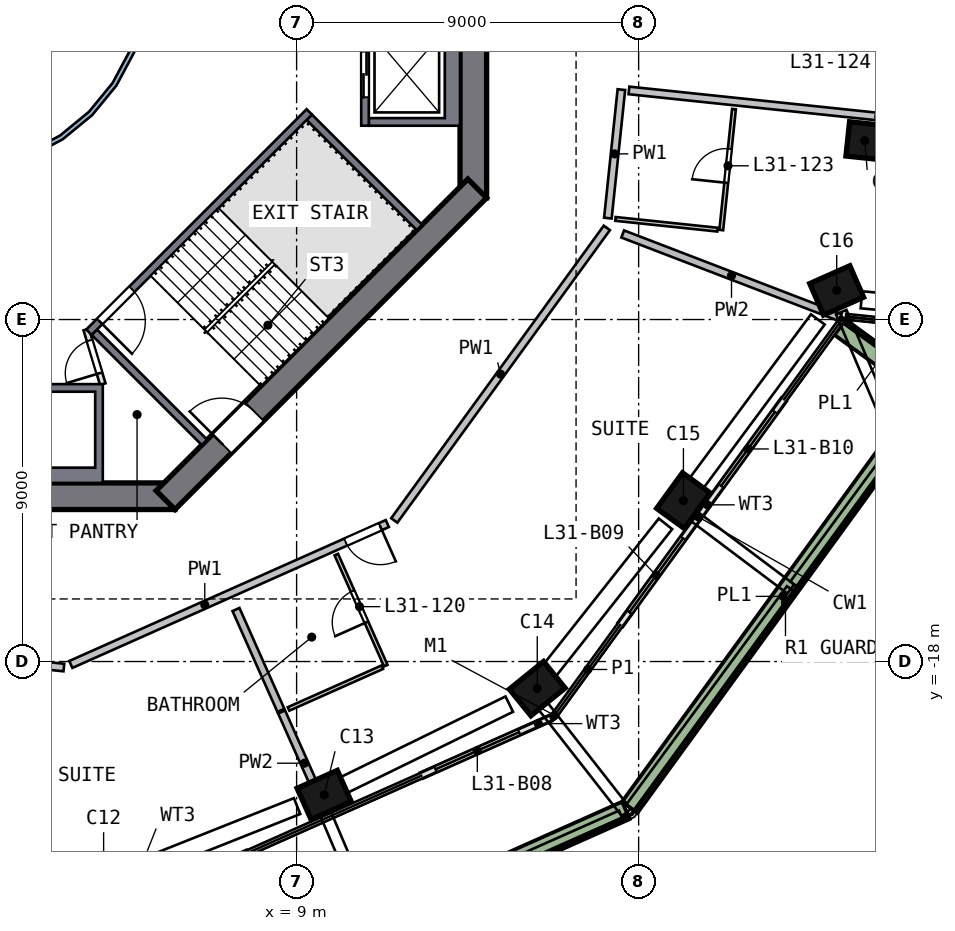
"""IFC4 building model, lengths in metres.
Left out: names, types, materials, properties, quantities, classifications, styles, units other than length and angle.
Written with IfcOpenShell. Run it as: python <this file> out.ifc"""

import sys

from ifc_helpers import new_model, si_unit, direction, frame, frame_2d, origin, origin_2d, place, context, subcontext, project, spatial, polyline, rectangle, outline, extrude, element, fill, save


model = new_model("IFC4")
c1 = context("Model", 3, precision=1e-05, world=origin(), true_north=direction((0.0, 1.0)))
c2 = subcontext(c1, "Body", "Model", "MODEL_VIEW")
j1 = project(units=[si_unit("LENGTHUNIT", "METRE"), si_unit("PLANEANGLEUNIT", "RADIAN")], contexts=[c1])
p1 = place(None, origin())
s1 = spatial("IfcSite", under=j1, at=p1, CompositionType="ELEMENT")
p2 = place(p1, origin())
s2 = spatial("IfcBuilding", under=s1, at=p2, CompositionType="ELEMENT")
p3 = place(p2, frame((0.0, 0.0, 133.0)))
s3 = spatial("IfcBuildingStorey", under=s2, at=p3, CompositionType="ELEMENT", Elevation=133.0)
p4 = place(p3, frame((9.602, -21.567, 0.0), z_axis=(0.102211608, 0.046542786, 0.993673264), x_axis=(0.907792136, 0.40410505, -0.112305596)))
e1 = element("IfcColumn", 1, at=p4, inside=s3, PredefinedType="COLUMN", context=c2, shape_type="SweptSolid", body=[
    extrude(rectangle(XDim=1.15, YDim=0.9, at=origin_2d()), origin(), (0.0, 0.0, 1.0), 3.21),
])
p5 = place(p3, frame((15.225, -18.801, 0.0), z_axis=(0.088798823, 0.073137387, 0.993360806), x_axis=(-0.772101593, -0.62500061, 0.115036373)))
e2 = element("IfcColumn", 2, at=p5, inside=s3, PredefinedType="COLUMN", context=c2, shape_type="SweptSolid", body=[
    extrude(rectangle(XDim=1.15, YDim=0.9, at=origin_2d()), origin(), (0.0, 0.0, 1.0), 3.211),
])
p6 = place(p3, frame((19.1, -13.877, 0.0), z_axis=(0.065251144, 0.091412441, 0.993673012), x_axis=(0.584148171, 0.803839453, -0.112307833)))
e3 = element("IfcColumn", 3, at=p6, inside=s3, PredefinedType="COLUMN", context=c2, shape_type="SweptSolid", body=[
    extrude(rectangle(XDim=1.15, YDim=0.9, at=origin_2d()), origin(), (0.0, 0.0, 1.0), 3.21),
])
p7 = place(p3, frame((23.164, -8.367, 0.0), z_axis=(0.038840208, 0.110439964, 0.993123584), x_axis=(-0.913350334, -0.399215187, 0.080114931)))
e4 = element("IfcColumn", 4, at=p7, inside=s3, PredefinedType="COLUMN", context=c2, shape_type="SweptSolid", body=[
    extrude(rectangle(XDim=1.15, YDim=0.9, at=origin_2d()), origin(), (0.0, 0.0, 1.0), 3.212),
])
p8 = place(p3, frame((23.926, -4.432, 0.0), z_axis=(0.020069399, 0.113954657, 0.99328322), x_axis=(0.99443788, -0.105017082, -0.008044619)))
e5 = element("IfcColumn", 5, at=p8, inside=s3, PredefinedType="COLUMN", context=c2, shape_type="SweptSolid", body=[
    extrude(rectangle(XDim=0.9, YDim=0.9, at=origin_2d()), origin(), (0.0, 0.0, 1.0), 3.211),
])
p9 = place(p3, frame((13.65, -5.799, 0.0), z_axis=(0.0, 0.0, 1.0), x_axis=(0.0, 1.0, 0.0)))
e6 = element("IfcWall", 6, at=p9, inside=s3, PredefinedType="SHEAR", context=c2, shape_type="SweptSolid", body=[
    extrude(rectangle(XDim=11.598, YDim=0.7, at=frame_2d((5.799, 0.0))), origin(), (0.0, 0.0, 1.0), 3.5),
])
p10 = place(p9, frame((4.899, 0.0, 0.0)))
e7 = element("IfcOpeningElement", 7, at=p10, cuts=e6, PredefinedType="OPENING", context=c2, shape_type="SweptSolid", body=[
    extrude(rectangle(XDim=1.8, YDim=2.1, at=frame_2d((0.9, 1.05))), frame((0.0, 0.36, 0.0), z_axis=(0.0, -1.0, 0.0), x_axis=(1.0, 0.0, 0.0)), (0.0, 0.0, 1.0), 0.72),
])
p11 = place(p3, frame((-5.799, -13.65, 0.0), z_axis=(0.0, 0.0, 1.0), x_axis=(1.0, 0.0, 0.0)))
e8 = element("IfcWall", 8, at=p11, inside=s3, PredefinedType="SHEAR", context=c2, shape_type="SweptSolid", body=[
    extrude(rectangle(XDim=11.598, YDim=0.7, at=frame_2d((5.799, 0.0))), origin(), (0.0, 0.0, 1.0), 3.5),
])
p12 = place(p11, frame((4.899, 0.0, 0.0)))
e9 = element("IfcOpeningElement", 9, at=p12, cuts=e8, PredefinedType="OPENING", context=c2, shape_type="SweptSolid", body=[
    extrude(rectangle(XDim=1.8, YDim=2.1, at=frame_2d((0.9, 1.05))), frame((0.0, 0.36, 0.0), z_axis=(0.0, -1.0, 0.0), x_axis=(1.0, 0.0, 0.0)), (0.0, 0.0, 1.0), 0.72),
])
p13 = place(p3, frame((5.552, -13.752, 0.0), z_axis=(0.0, 0.0, 1.0), x_axis=(0.707106781, 0.707106781, 0.0)))
e10 = element("IfcWall", 10, at=p13, inside=s3, PredefinedType="SHEAR", context=c2, shape_type="SweptSolid", body=[
    extrude(rectangle(XDim=11.598, YDim=0.7, at=frame_2d((5.799, 0.0))), origin(), (0.0, 0.0, 1.0), 3.5),
])
p14 = place(p13, frame((2.099, 0.0, 0.0)))
e11 = element("IfcOpeningElement", 11, at=p14, cuts=e10, PredefinedType="OPENING", context=c2, shape_type="SweptSolid", body=[
    extrude(rectangle(XDim=1.2, YDim=2.1, at=frame_2d((0.6, 1.05))), frame((0.0, 0.36, 0.0), z_axis=(0.0, -1.0, 0.0), x_axis=(1.0, 0.0, 0.0)), (0.0, 0.0, 1.0), 0.72),
])
p15 = place(p3, frame((3.99, -24.696, 0.0), z_axis=(0.0, 0.0, 1.0), x_axis=(0.913541573, 0.406745368, 0.0)))
e12 = element("IfcWall", 12, at=p15, inside=s3, PredefinedType="SOLIDWALL", context=c2, shape_type="SweptSolid", body=[
    extrude(rectangle(XDim=4.068, YDim=0.15, at=frame_2d((2.034, 0.0))), origin(), (0.0, 0.0, 1.0), 2.475),
])
p16 = place(p15, frame((1.268, 0.0, 0.0)))
e13 = element("IfcOpeningElement", 13, at=p16, cuts=e12, PredefinedType="OPENING", context=c2, shape_type="SweptSolid", body=[
    extrude(rectangle(XDim=2.4, YDim=2.4, at=frame_2d((1.2, 1.2))), frame((0.0, 0.085, 0.0), z_axis=(0.0, -1.0, 0.0), x_axis=(1.0, 0.0, 0.0)), (0.0, 0.0, 1.0), 0.17),
])
p17 = place(p3, frame((12.293, -20.999, 0.0), z_axis=(0.0, 0.0, 1.0), x_axis=(0.913548143, 0.406730611, 0.0)))
e14 = element("IfcWall", 14, at=p17, inside=s3, PredefinedType="SOLIDWALL", context=c2, shape_type="SweptSolid", body=[
    extrude(rectangle(XDim=3.71, YDim=0.15, at=frame_2d((1.855, 0.0))), origin(), (0.0, 0.0, 1.0), 2.475),
])
p18 = place(p17, frame((0.4, 0.0, 0.0)))
e15 = element("IfcOpeningElement", 15, at=p18, cuts=e14, PredefinedType="OPENING", context=c2, shape_type="SweptSolid", body=[
    extrude(rectangle(XDim=2.4, YDim=2.4, at=frame_2d((1.2, 1.2))), frame((0.0, 0.085, 0.0), z_axis=(0.0, -1.0, 0.0), x_axis=(1.0, 0.0, 0.0)), (0.0, 0.0, 1.0), 0.17),
])
p19 = place(p3, frame((17.522, -17.026, 0.0), z_axis=(0.0, 0.0, 1.0), x_axis=(0.587778943, 0.809021578, 0.0)))
e16 = element("IfcWall", 16, at=p19, inside=s3, PredefinedType="SOLIDWALL", context=c2, shape_type="SweptSolid", body=[
    extrude(rectangle(XDim=3.475, YDim=0.15, at=frame_2d((1.737, 0.0))), origin(), (0.0, 0.0, 1.0), 2.475),
])
p20 = place(p19, frame((0.4, 0.0, 0.0)))
e17 = element("IfcOpeningElement", 17, at=p20, cuts=e16, PredefinedType="OPENING", context=c2, shape_type="SweptSolid", body=[
    extrude(rectangle(XDim=2.4, YDim=2.4, at=frame_2d((1.2, 1.2))), frame((0.0, 0.085, 0.0), z_axis=(0.0, -1.0, 0.0), x_axis=(1.0, 0.0, 0.0)), (0.0, 0.0, 1.0), 0.17),
])
p21 = place(p3, frame((19.565, -14.215, 0.0), z_axis=(0.0, 0.0, 1.0), x_axis=(0.58777044, 0.809027756, 0.0)))
e18 = element("IfcWall", 18, at=p21, inside=s3, PredefinedType="SOLIDWALL", context=c2, shape_type="SweptSolid", body=[
    extrude(rectangle(XDim=3.835, YDim=0.15, at=frame_2d((1.918, 0.0))), origin(), (0.0, 0.0, 1.0), 2.475),
])
p22 = place(p21, frame((1.035, 0.0, 0.0)))
e19 = element("IfcOpeningElement", 19, at=p22, cuts=e18, PredefinedType="OPENING", context=c2, shape_type="SweptSolid", body=[
    extrude(rectangle(XDim=2.4, YDim=2.4, at=frame_2d((1.2, 1.2))), frame((0.0, 0.085, 0.0), z_axis=(0.0, -1.0, 0.0), x_axis=(1.0, 0.0, 0.0)), (0.0, 0.0, 1.0), 0.17),
])
p23 = place(p3, frame((5.585, -27.296, 0.0), z_axis=(0.0, 0.0, 1.0), x_axis=(0.913544877, 0.406737947, 0.0)))
e20 = element("IfcWall", 20, at=p23, inside=s3, PredefinedType="SOLIDWALL", context=c2, shape_type="SweptSolid", body=[
    extrude(rectangle(XDim=13.223, YDim=0.5, at=frame_2d((6.612, 0.0))), origin(), (0.0, 0.0, 1.0), 0.7),
])
p24 = place(p3, frame((17.766, -21.837, 0.0), z_axis=(0.0, 0.0, 1.0), x_axis=(0.587782365, 0.809019092, 0.0)))
e21 = element("IfcWall", 21, at=p24, inside=s3, PredefinedType="SOLIDWALL", context=c2, shape_type="SweptSolid", body=[
    extrude(rectangle(XDim=13.723, YDim=0.5, at=frame_2d((6.862, 0.0))), origin(), (0.0, 0.0, 1.0), 0.7),
])
p25 = place(p3, frame((25.483, -10.789, 0.0), z_axis=(0.0, 0.0, 1.0), x_axis=(-0.809025441, 0.587773626, 0.0)))
e22 = element("IfcWall", 22, at=p25, inside=s3, PredefinedType="SOLIDWALL", context=c2, shape_type="SweptSolid", body=[
    extrude(rectangle(XDim=2.699, YDim=0.5, at=frame_2d((1.35, 0.0))), origin(), (0.0, 0.0, 1.0), 0.7),
])
p26 = place(p3, origin())
e23 = element("IfcWall", 23, at=p26, inside=s3, PredefinedType="SOLIDWALL", context=c2, shape_type="SweptSolid", body=[
    extrude(outline(polyline([(13.3, -3.9), (10.9, -3.9), (10.9, -3.7), (12.9, -3.7), (12.9, -1.4), (10.9, -1.4), (10.9, -1.2), (13.3, -1.2), (13.3, -3.9)])), origin(), (0.0, 0.0, 1.0), 3.19),
])
p27 = place(p3, frame((10.8, -1.2, 0.0), z_axis=(0.0, 0.0, 1.0), x_axis=(0.0, -1.0, 0.0)))
e24 = element("IfcWall", 24, at=p27, inside=s3, PredefinedType="SOLIDWALL", context=c2, shape_type="SweptSolid", body=[
    extrude(rectangle(XDim=2.7, YDim=0.2, at=frame_2d((1.35, 0.0))), origin(), (0.0, 0.0, 1.0), 3.19),
])
p28 = place(p27, frame((0.75, 0.0, 0.0)))
e25 = element("IfcOpeningElement", 25, at=p28, cuts=e24, PredefinedType="OPENING", context=c2, shape_type="SweptSolid", body=[
    extrude(rectangle(XDim=1.2, YDim=2.1, at=frame_2d((0.6, 1.05))), frame((0.0, 0.11, 0.0), z_axis=(0.0, -1.0, 0.0), x_axis=(1.0, 0.0, 0.0)), (0.0, 0.0, 1.0), 0.22),
])
p29 = place(p3, origin())
e26 = element("IfcWall", 26, at=p29, inside=s3, PredefinedType="SOLIDWALL", context=c2, shape_type="SweptSolid", body=[
    extrude(outline(polyline([(3.9, -10.7), (3.9, -13.3), (1.2, -13.3), (1.2, -10.7), (3.9, -10.7)]), holes=[polyline([(1.4, -12.9), (3.7, -12.9), (3.7, -10.9), (1.4, -10.9), (1.4, -12.9)])]), origin(), (0.0, 0.0, 1.0), 3.19),
])
p30 = place(p3, frame((9.334, -3.535, 0.0), z_axis=(0.0, 0.0, 1.0), x_axis=(-0.707106781, -0.707106781, 0.0)))
e27 = element("IfcWall", 27, at=p30, inside=s3, PredefinedType="SOLIDWALL", context=c2, shape_type="SweptSolid", body=[
    extrude(rectangle(XDim=8.2, YDim=0.2, at=frame_2d((4.1, 0.0))), origin(), (0.0, 0.0, 1.0), 3.19),
])
p31 = place(p30, frame((6.6, 0.0, 0.0)))
e28 = element("IfcOpeningElement", 28, at=p31, cuts=e27, PredefinedType="OPENING", context=c2, shape_type="SweptSolid", body=[
    extrude(rectangle(XDim=1.2, YDim=2.1, at=frame_2d((0.6, 1.05))), frame((0.0, 0.11, 0.0), z_axis=(0.0, -1.0, 0.0), x_axis=(1.0, 0.0, 0.0)), (0.0, 0.0, 1.0), 0.22),
])
for number, where, z_axis, x_axis in (
    (29, (3.677, -9.334, 0.0), (0.0, 0.0, 1.0), (0.707, -0.707, 0.0)),
    (30, (9.334, -3.677, 0.0), (0.0, 0.0, 1.0), (0.707, -0.707, 0.0)),
):
    element("IfcWall", number, at=place(p3, frame(where, z_axis=z_axis, x_axis=x_axis)), inside=s3, PredefinedType="SOLIDWALL", context=c2, shape_type="SweptSolid", body=[
        extrude(rectangle(XDim=4.1, YDim=0.2, at=frame_2d((2.05, 0.0))), origin(), (0.0, 0.0, 1.0), 3.19),
    ])
p32 = place(p3, frame((3.9, -10.7, 0.0), z_axis=(0.0, 0.0, 1.0), x_axis=(-0.289808785, 0.957084567, 0.0)))
e31 = element("IfcWall", 31, at=p32, inside=s3, PredefinedType="PARTITIONING", context=c2, shape_type="SweptSolid", body=[
    extrude(rectangle(XDim=1.501, YDim=0.15, at=frame_2d((0.75, 0.0))), origin(), (0.0, 0.0, 1.0), 3.19),
])
p33 = place(p32, frame((0.301, 0.0, 0.0)))
e32 = element("IfcOpeningElement", 32, at=p33, cuts=e31, PredefinedType="OPENING", context=c2, shape_type="SweptSolid", body=[
    extrude(rectangle(XDim=0.9, YDim=2.1, at=frame_2d((0.45, 1.05))), frame((0.0, 0.085, 0.0), z_axis=(0.0, -1.0, 0.0), x_axis=(1.0, 0.0, 0.0)), (0.0, 0.0, 1.0), 0.17),
])
p34 = place(p3, origin())
e33 = element("IfcWall", 33, at=p34, inside=s3, PredefinedType="SOLIDWALL", context=c2, shape_type="SweptSolid", body=[
    extrude(outline(polyline([(5.021, -0.999), (4.73, -1.959), (4.257, -2.844), (3.62, -3.62), (2.844, -4.257), (1.959, -4.73), (0.999, -5.021), (0.0, -5.12), (-0.999, -5.021), (-1.959, -4.73), (-2.844, -4.257), (-3.62, -3.62), (-4.257, -2.844), (-4.73, -1.959), (-5.021, -0.999), (-5.12, 0.0), (-5.021, 0.999), (-4.73, 1.959), (-4.257, 2.844), (-3.62, 3.62), (-2.844, 4.257), (-1.959, 4.73), (-0.999, 5.021), (0.0, 5.12), (0.999, 5.021), (1.959, 4.73), (2.844, 4.257), (3.62, 3.62), (4.257, 2.844), (4.73, 1.959), (5.021, 0.999), (5.12, 0.0), (5.021, -0.999)]), holes=[polyline([(4.904, 0.976), (4.619, 1.913), (4.157, 2.778), (3.535, 3.535), (2.778, 4.157), (1.913, 4.619), (0.976, 4.904), (0.0, 5.0), (-0.976, 4.904), (-1.913, 4.619), (-2.778, 4.157), (-3.535, 3.535), (-4.157, 2.778), (-4.619, 1.913), (-4.904, 0.976), (-5.0, 0.0), (-4.904, -0.976), (-4.619, -1.913), (-4.157, -2.778), (-3.535, -3.535), (-2.778, -4.157), (-1.913, -4.619), (-0.976, -4.904), (0.0, -5.0), (0.976, -4.904), (1.913, -4.619), (2.778, -4.157), (3.535, -3.535), (4.157, -2.778), (4.619, -1.913), (4.904, -0.976), (5.0, 0.0), (4.904, 0.976)])]), origin(), (0.0, 0.0, 1.0), 3.19),
])
p35 = place(p3, frame((2.875, -18.158, 0.0), z_axis=(0.0, 0.0, 1.0), x_axis=(-0.99452259, 0.104521851, 0.0)))
e34 = element("IfcWall", 34, at=p35, inside=s3, PredefinedType="SOLIDWALL", context=c2, shape_type="SweptSolid", body=[
    extrude(rectangle(XDim=9.516, YDim=0.2, at=frame_2d((4.758, 0.0))), origin(), (0.0, 0.0, 1.0), 3.19),
])
p36 = place(p35, frame((5.15, 0.0, 0.0)))
e35 = element("IfcOpeningElement", 35, at=p36, cuts=e34, PredefinedType="OPENING", context=c2, shape_type="SweptSolid", body=[
    extrude(rectangle(XDim=1.0, YDim=2.1, at=frame_2d((0.5, 1.05))), frame((0.0, 0.11, 0.0), z_axis=(0.0, -1.0, 0.0), x_axis=(1.0, 0.0, 0.0)), (0.0, 0.0, 1.0), 0.22),
])
p37 = place(p3, frame((11.387, -14.369, 0.0), z_axis=(0.0, 0.0, 1.0), x_axis=(-0.913542974, -0.406742221, 0.0)))
e36 = element("IfcWall", 36, at=p37, inside=s3, PredefinedType="SOLIDWALL", context=c2, shape_type="SweptSolid", body=[
    extrude(rectangle(XDim=9.116, YDim=0.2, at=frame_2d((4.558, 0.0))), origin(), (0.0, 0.0, 1.0), 3.19),
])
p38 = place(p37, frame((0.2, 0.0, 0.0)))
e37 = element("IfcOpeningElement", 37, at=p38, cuts=e36, PredefinedType="OPENING", context=c2, shape_type="SweptSolid", body=[
    extrude(rectangle(XDim=1.0, YDim=2.1, at=frame_2d((0.5, 1.05))), frame((0.0, 0.11, 0.0), z_axis=(0.0, -1.0, 0.0), x_axis=(1.0, 0.0, 0.0)), (0.0, 0.0, 1.0), 0.22),
])
p39 = place(p3, frame((11.57, -14.287, 0.0), z_axis=(0.0, 0.0, 1.0), x_axis=(0.587784152, 0.809017794, 0.0)))
e38 = element("IfcWall", 38, at=p39, inside=s3, PredefinedType="SOLIDWALL", context=c2, shape_type="SweptSolid", body=[
    extrude(rectangle(XDim=9.516, YDim=0.2, at=frame_2d((4.758, 0.0))), origin(), (0.0, 0.0, 1.0), 3.19),
])
p40 = place(p3, frame((17.191, -6.332, 0.0), z_axis=(0.0, 0.0, 1.0), x_axis=(0.10455022, 0.994519608, 0.0)))
e39 = element("IfcWall", 39, at=p40, inside=s3, PredefinedType="SOLIDWALL", context=c2, shape_type="SweptSolid", body=[
    extrude(rectangle(XDim=3.4, YDim=0.2, at=frame_2d((1.7, 0.0))), origin(), (0.0, 0.0, 1.0), 3.19),
])
p41 = place(p3, frame((17.745, -2.971, 0.0), z_axis=(0.0, 0.0, 1.0), x_axis=(0.994522348, -0.10452416, 0.0)))
e40 = element("IfcWall", 40, at=p41, inside=s3, PredefinedType="SOLIDWALL", context=c2, shape_type="SweptSolid", body=[
    extrude(rectangle(XDim=13.213, YDim=0.2, at=frame_2d((6.606, 0.0))), origin(), (0.0, 0.0, 1.0), 3.19),
])
p42 = place(p3, frame((17.776, -0.762, 0.0), z_axis=(0.0, 0.0, 1.0), x_axis=(0.994521896, -0.104528454, 0.0)))
e41 = element("IfcWall", 41, at=p42, inside=s3, PredefinedType="SOLIDWALL", context=c2, shape_type="SweptSolid", body=[
    extrude(rectangle(XDim=13.414, YDim=0.2, at=frame_2d((6.707, 0.0))), origin(), (0.0, 0.0, 1.0), 3.19),
])
p43 = place(p42, frame((4.8, 0.0, 0.0)))
e42 = element("IfcOpeningElement", 42, at=p43, cuts=e41, PredefinedType="OPENING", context=c2, shape_type="SweptSolid", body=[
    extrude(rectangle(XDim=1.0, YDim=2.1, at=frame_2d((0.5, 1.05))), frame((0.0, 0.11, 0.0), z_axis=(0.0, -1.0, 0.0), x_axis=(1.0, 0.0, 0.0)), (0.0, 0.0, 1.0), 0.22),
])
p44 = place(p3, frame((7.405, -16.632, 0.0), z_axis=(0.0, 0.0, 1.0), x_axis=(0.406723275, -0.91355141, 0.0)))
e43 = element("IfcWall", 43, at=p44, inside=s3, PredefinedType="SOLIDWALL", context=c2, shape_type="SweptSolid", body=[
    extrude(rectangle(XDim=2.905, YDim=0.2, at=frame_2d((1.452, 0.0))), origin(), (0.0, 0.0, 1.0), 3.19),
])
p45 = place(p3, frame((8.605, -19.327, 0.0), z_axis=(0.0, 0.0, 1.0), x_axis=(0.406767648, -0.913531653, 0.0)))
e44 = element("IfcWall", 44, at=p45, inside=s3, PredefinedType="SOLIDWALL", context=c2, shape_type="SweptSolid", body=[
    extrude(rectangle(XDim=2.952, YDim=0.2, at=frame_2d((1.476, 0.0))), origin(), (0.0, 0.0, 1.0), 3.19),
])
p46 = place(p3, frame((17.581, -6.749, 0.0), z_axis=(0.0, 0.0, 1.0), x_axis=(0.933578347, -0.358373367, 0.0)))
e45 = element("IfcWall", 45, at=p46, inside=s3, PredefinedType="SOLIDWALL", context=c2, shape_type="SweptSolid", body=[
    extrude(rectangle(XDim=6.132, YDim=0.2, at=frame_2d((3.066, 0.0))), origin(), (0.0, 0.0, 1.0), 3.19),
])
p47 = place(p3, frame((11.255, -18.15, 0.0), z_axis=(0.0, 0.0, 1.0), x_axis=(-0.913550343, -0.40672567, 0.0)))
e46 = element("IfcWall", 46, at=p47, inside=s3, PredefinedType="PARTITIONING", context=c2, shape_type="SweptSolid", body=[
    extrude(rectangle(XDim=2.7, YDim=0.1, at=frame_2d((1.35, 0.0))), origin(), (0.0, 0.0, 1.0), 3.19),
])
p48 = place(p3, frame((11.346, -18.109, 0.0), z_axis=(0.0, 0.0, 1.0), x_axis=(-0.406725928, 0.913550228, 0.0)))
e47 = element("IfcWall", 47, at=p48, inside=s3, PredefinedType="PARTITIONING", context=c2, shape_type="SweptSolid", body=[
    extrude(rectangle(XDim=3.2, YDim=0.1, at=frame_2d((1.6, 0.0))), origin(), (0.0, 0.0, 1.0), 3.19),
])
p49 = place(p48, frame((1.25, 0.0, 0.0)))
e48 = element("IfcOpeningElement", 48, at=p49, cuts=e47, PredefinedType="OPENING", context=c2, shape_type="SweptSolid", body=[
    extrude(rectangle(XDim=0.9, YDim=2.1, at=frame_2d((0.45, 1.05))), frame((0.0, 0.06, 0.0), z_axis=(0.0, -1.0, 0.0), x_axis=(1.0, 0.0, 0.0)), (0.0, 0.0, 1.0), 0.12),
])
p50 = place(p3, frame((17.39, -6.353, 0.0), z_axis=(0.0, 0.0, 1.0), x_axis=(0.994521297, -0.104534153, 0.0)))
e49 = element("IfcWall", 49, at=p50, inside=s3, PredefinedType="PARTITIONING", context=c2, shape_type="SweptSolid", body=[
    extrude(rectangle(XDim=2.7, YDim=0.1, at=frame_2d((1.35, 0.0))), origin(), (0.0, 0.0, 1.0), 3.19),
])
p51 = place(p3, frame((20.174, -6.645, 0.0), z_axis=(0.0, 0.0, 1.0), x_axis=(0.104517989, 0.994522996, 0.0)))
e50 = element("IfcWall", 50, at=p51, inside=s3, PredefinedType="PARTITIONING", context=c2, shape_type="SweptSolid", body=[
    extrude(rectangle(XDim=3.2, YDim=0.1, at=frame_2d((1.6, 0.0))), origin(), (0.0, 0.0, 1.0), 3.19),
])
p52 = place(p51, frame((1.25, 0.0, 0.0)))
e51 = element("IfcOpeningElement", 51, at=p52, cuts=e50, PredefinedType="OPENING", context=c2, shape_type="SweptSolid", body=[
    extrude(rectangle(XDim=0.9, YDim=2.1, at=frame_2d((0.45, 1.05))), frame((0.0, 0.06, 0.0), z_axis=(0.0, -1.0, 0.0), x_axis=(1.0, 0.0, 0.0)), (0.0, 0.0, 1.0), 0.12),
])
p53 = place(p18, origin())
e52 = element("IfcDoor", 52, at=p53, inside=s3, OperationType="SLIDING_TO_RIGHT", PredefinedType="DOOR", context=c2, shape_type="SweptSolid", body=[
    extrude(rectangle(XDim=2.4, YDim=2.4, at=frame_2d((1.2, 1.2))), frame((0.0, 0.025, 0.0), z_axis=(0.0, -1.0, 0.0), x_axis=(1.0, 0.0, 0.0)), (0.0, 0.0, 1.0), 0.05),
])
fill(e15, e52)
p54 = place(p20, origin())
e53 = element("IfcDoor", 53, at=p54, inside=s3, OperationType="SLIDING_TO_RIGHT", PredefinedType="DOOR", context=c2, shape_type="SweptSolid", body=[
    extrude(rectangle(XDim=2.4, YDim=2.4, at=frame_2d((1.2, 1.2))), frame((0.0, 0.025, 0.0), z_axis=(0.0, -1.0, 0.0), x_axis=(1.0, 0.0, 0.0)), (0.0, 0.0, 1.0), 0.05),
])
fill(e17, e53)
p55 = place(p22, origin())
e54 = element("IfcDoor", 54, at=p55, inside=s3, OperationType="SLIDING_TO_LEFT", PredefinedType="DOOR", context=c2, shape_type="SweptSolid", body=[
    extrude(rectangle(XDim=2.4, YDim=2.4, at=frame_2d((1.2, 1.2))), frame((0.0, 0.025, 0.0), z_axis=(0.0, -1.0, 0.0), x_axis=(1.0, 0.0, 0.0)), (0.0, 0.0, 1.0), 0.05),
])
fill(e19, e54)
p56 = place(p28, origin())
e55 = element("IfcDoor", 55, at=p56, inside=s3, OperationType="DOUBLE_DOOR_SLIDING", PredefinedType="DOOR", context=c2, shape_type="SweptSolid", body=[
    extrude(rectangle(XDim=1.2, YDim=2.1, at=frame_2d((0.6, 1.05))), frame((0.0, 0.025, 0.0), z_axis=(0.0, -1.0, 0.0), x_axis=(1.0, 0.0, 0.0)), (0.0, 0.0, 1.0), 0.05),
])
fill(e25, e55)
p57 = place(p31, origin())
e56 = element("IfcDoor", 56, at=p57, inside=s3, OperationType="SINGLE_SWING_RIGHT", PredefinedType="DOOR", context=c2, shape_type="SweptSolid", body=[
    extrude(rectangle(XDim=1.2, YDim=2.1, at=frame_2d((0.6, 1.05))), frame((0.0, 0.025, 0.0), z_axis=(0.0, -1.0, 0.0), x_axis=(1.0, 0.0, 0.0)), (0.0, 0.0, 1.0), 0.05),
])
fill(e28, e56)
p58 = place(p14, origin())
e57 = element("IfcDoor", 57, at=p58, inside=s3, OperationType="SINGLE_SWING_LEFT", PredefinedType="DOOR", context=c2, shape_type="SweptSolid", body=[
    extrude(rectangle(XDim=1.2, YDim=2.1, at=frame_2d((0.6, 1.05))), frame((0.0, 0.025, 0.0), z_axis=(0.0, -1.0, 0.0), x_axis=(1.0, 0.0, 0.0)), (0.0, 0.0, 1.0), 0.05),
])
fill(e11, e57)
p59 = place(p33, origin())
e58 = element("IfcDoor", 58, at=p59, inside=s3, OperationType="SINGLE_SWING_LEFT", PredefinedType="DOOR", context=c2, shape_type="SweptSolid", body=[
    extrude(rectangle(XDim=0.9, YDim=2.1, at=frame_2d((0.45, 1.05))), frame((0.0, 0.025, 0.0), z_axis=(0.0, -1.0, 0.0), x_axis=(1.0, 0.0, 0.0)), (0.0, 0.0, 1.0), 0.05),
])
fill(e32, e58)
p60 = place(p38, origin())
e59 = element("IfcDoor", 59, at=p60, inside=s3, OperationType="SINGLE_SWING_LEFT", PredefinedType="DOOR", context=c2, shape_type="SweptSolid", body=[
    extrude(rectangle(XDim=1.0, YDim=2.1, at=frame_2d((0.5, 1.05))), frame((0.0, 0.025, 0.0), z_axis=(0.0, -1.0, 0.0), x_axis=(1.0, 0.0, 0.0)), (0.0, 0.0, 1.0), 0.05),
])
fill(e37, e59)
p61 = place(p49, origin())
e60 = element("IfcDoor", 60, at=p61, inside=s3, OperationType="SINGLE_SWING_LEFT", PredefinedType="DOOR", context=c2, shape_type="SweptSolid", body=[
    extrude(rectangle(XDim=0.9, YDim=2.1, at=frame_2d((0.45, 1.05))), frame((0.0, 0.025, 0.0), z_axis=(0.0, -1.0, 0.0), x_axis=(1.0, 0.0, 0.0)), (0.0, 0.0, 1.0), 0.05),
])
fill(e48, e60)
p62 = place(p52, origin())
e61 = element("IfcDoor", 61, at=p62, inside=s3, OperationType="SINGLE_SWING_LEFT", PredefinedType="DOOR", context=c2, shape_type="SweptSolid", body=[
    extrude(rectangle(XDim=0.9, YDim=2.1, at=frame_2d((0.45, 1.05))), frame((0.0, 0.025, 0.0), z_axis=(0.0, -1.0, 0.0), x_axis=(1.0, 0.0, 0.0)), (0.0, 0.0, 1.0), 0.05),
])
fill(e51, e61)
save(model, sys.argv[1])
